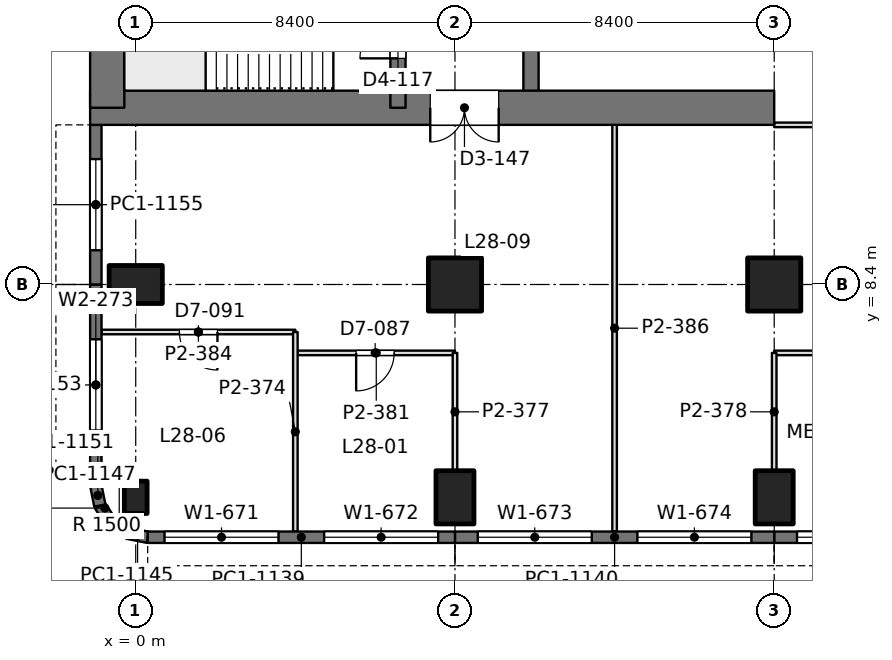
"""IFC4 building model, lengths in metres.
Left out: names, types, materials, properties, quantities, classifications, styles, units other than length and angle.
Written with IfcOpenShell. Run it as: python <this file> out.ifc"""

import sys

from ifc_helpers import new_model, si_unit, direction, frame, frame_2d, origin, origin_2d, place, context, subcontext, project, spatial, rectangle, extrude, element, fill, save


model = new_model("IFC4")
c1 = context("Model", 3, precision=1e-05, world=origin(), true_north=direction((0.0, 1.0)))
c2 = subcontext(c1, "Body", "Model", "MODEL_VIEW")
j1 = project(units=[si_unit("LENGTHUNIT", "METRE"), si_unit("PLANEANGLEUNIT", "RADIAN")], contexts=[c1])
p1 = place(None, origin())
s1 = spatial("IfcSite", under=j1, at=p1, CompositionType="ELEMENT")
p2 = place(p1, origin())
s2 = spatial("IfcBuilding", under=s1, at=p2, CompositionType="ELEMENT")
p3 = place(p2, frame((0.0, 0.0, 126.0)))
s3 = spatial("IfcBuildingStorey", under=s2, at=p3, CompositionType="ELEMENT", Elevation=126.0)
p4 = place(p3, frame((0.0, 2.8, 0.0), z_axis=(0.0, 0.0, 1.0), x_axis=(1.0, 0.0, 0.0)))
e1 = element("IfcColumn", 1, at=p4, inside=s3, PredefinedType="COLUMN", context=c2, shape_type="SweptSolid", body=[
    extrude(rectangle(XDim=0.6, YDim=0.85, at=origin_2d()), origin(), (0.0, 0.0, 1.0), 4.2),
])
for number, where, z_axis, x_axis in (
    (2, (0.0, 8.4, 0.0), (0.0, 0.0, 1.0), (0.0, 1.0, 0.0)),
    (3, (8.4, 2.8, 0.0), (0.0, 0.0, 1.0), (1.0, 0.0, 0.0)),
):
    element("IfcColumn", number, at=place(p3, frame(where, z_axis=z_axis, x_axis=x_axis)), inside=s3, PredefinedType="COLUMN", context=c2, shape_type="SweptSolid", body=[
        extrude(rectangle(XDim=1.0, YDim=1.4, at=origin_2d()), origin(), (0.0, 0.0, 1.0), 4.2),
    ])
p5 = place(p3, frame((8.4, 8.4, 0.0), z_axis=(0.0, 0.0, 1.0), x_axis=(1.0, 0.0, 0.0)))
e4 = element("IfcColumn", 4, at=p5, inside=s3, PredefinedType="COLUMN", context=c2, shape_type="SweptSolid", body=[
    extrude(rectangle(XDim=1.4, YDim=1.4, at=origin_2d()), origin(), (0.0, 0.0, 1.0), 4.2),
])
p6 = place(p3, frame((16.8, 2.8, 0.0), z_axis=(0.0, 0.0, 1.0), x_axis=(1.0, 0.0, 0.0)))
e5 = element("IfcColumn", 5, at=p6, inside=s3, PredefinedType="COLUMN", context=c2, shape_type="SweptSolid", body=[
    extrude(rectangle(XDim=1.0, YDim=1.4, at=origin_2d()), origin(), (0.0, 0.0, 1.0), 4.2),
])
p7 = place(p3, frame((16.8, 8.4, 0.0), z_axis=(0.0, 0.0, 1.0), x_axis=(1.0, 0.0, 0.0)))
e6 = element("IfcColumn", 6, at=p7, inside=s3, PredefinedType="COLUMN", context=c2, shape_type="SweptSolid", body=[
    extrude(rectangle(XDim=1.4, YDim=1.4, at=origin_2d()), origin(), (0.0, 0.0, 1.0), 4.2),
])
p8 = place(p3, frame((-1.2, 13.05, 0.0), z_axis=(0.0, 0.0, 1.0), x_axis=(1.0, 0.0, 0.0)))
e7 = element("IfcWall", 7, at=p8, inside=s3, PredefinedType="SHEAR", context=c2, shape_type="SweptSolid", body=[
    extrude(rectangle(XDim=18.0, YDim=0.9, at=frame_2d((9.0, 0.0))), origin(), (0.0, 0.0, 1.0), 4.2),
])
p9 = place(p8, frame((8.95, 0.0, 0.0)))
e8 = element("IfcOpeningElement", 8, at=p9, cuts=e7, PredefinedType="OPENING", context=c2, shape_type="SweptSolid", body=[
    extrude(rectangle(XDim=1.8, YDim=2.4, at=frame_2d((0.9, 1.2))), frame((0.0, 0.46, 0.0), z_axis=(0.0, -1.0, 0.0), x_axis=(1.0, 0.0, 0.0)), (0.0, 0.0, 1.0), 0.92),
])
p10 = place(p3, frame((-0.75, 13.05, 0.0), z_axis=(0.0, 0.0, 1.0), x_axis=(0.0, 1.0, 0.0)))
e9 = element("IfcWall", 9, at=p10, inside=s3, PredefinedType="SHEAR", context=c2, shape_type="SweptSolid", body=[
    extrude(rectangle(XDim=24.3, YDim=0.9, at=frame_2d((12.15, 0.0))), origin(), (0.0, 0.0, 1.0), 4.2),
])
p11 = place(p3, frame((6.9, 13.05, 0.0), z_axis=(0.0, 0.0, 1.0), x_axis=(0.0, 1.0, 0.0)))
e10 = element("IfcWall", 10, at=p11, inside=s3, PredefinedType="SHEAR", context=c2, shape_type="SweptSolid", body=[
    extrude(rectangle(XDim=24.3, YDim=0.4, at=frame_2d((12.15, 0.0))), origin(), (0.0, 0.0, 1.0), 4.2),
])
p12 = place(p11, frame((1.3, 0.0, 0.0)))
e11 = element("IfcOpeningElement", 11, at=p12, cuts=e10, PredefinedType="OPENING", context=c2, shape_type="SweptSolid", body=[
    extrude(rectangle(XDim=1.0, YDim=2.2, at=frame_2d((0.5, 1.1))), frame((0.0, 0.21, 0.0), z_axis=(0.0, -1.0, 0.0), x_axis=(1.0, 0.0, 0.0)), (0.0, 0.0, 1.0), 0.42),
])
p13 = place(p11, frame((22.0, 0.0, 0.0)))
e12 = element("IfcOpeningElement", 12, at=p13, cuts=e10, PredefinedType="OPENING", context=c2, shape_type="SweptSolid", body=[
    extrude(rectangle(XDim=1.0, YDim=2.2, at=frame_2d((0.5, 1.1))), frame((0.0, 0.21, 0.0), z_axis=(0.0, -1.0, 0.0), x_axis=(1.0, 0.0, 0.0)), (0.0, 0.0, 1.0), 0.42),
])
p14 = place(p11, frame((5.55, 0.0, 0.0)))
e13 = element("IfcOpeningElement", 13, at=p14, cuts=e10, PredefinedType="OPENING", context=c2, shape_type="SweptSolid", body=[
    extrude(rectangle(XDim=1.0, YDim=2.2, at=frame_2d((0.5, 1.1))), frame((0.0, 0.21, 0.0), z_axis=(0.0, -1.0, 0.0), x_axis=(1.0, 0.0, 0.0)), (0.0, 0.0, 1.0), 0.42),
])
p15 = place(p11, frame((9.55, 0.0, 0.0)))
e14 = element("IfcOpeningElement", 14, at=p15, cuts=e10, PredefinedType="OPENING", context=c2, shape_type="SweptSolid", body=[
    extrude(rectangle(XDim=1.0, YDim=2.2, at=frame_2d((0.5, 1.1))), frame((0.0, 0.21, 0.0), z_axis=(0.0, -1.0, 0.0), x_axis=(1.0, 0.0, 0.0)), (0.0, 0.0, 1.0), 0.42),
])
p16 = place(p11, frame((12.8, 0.0, 0.0)))
e15 = element("IfcOpeningElement", 15, at=p16, cuts=e10, PredefinedType="OPENING", context=c2, shape_type="SweptSolid", body=[
    extrude(rectangle(XDim=1.1, YDim=2.2, at=frame_2d((0.55, 1.1))), frame((0.0, 0.21, 0.0), z_axis=(0.0, -1.0, 0.0), x_axis=(1.0, 0.0, 0.0)), (0.0, 0.0, 1.0), 0.42),
])
p17 = place(p11, frame((15.538, 0.0, 0.0)))
e16 = element("IfcOpeningElement", 16, at=p17, cuts=e10, PredefinedType="OPENING", context=c2, shape_type="SweptSolid", body=[
    extrude(rectangle(XDim=1.1, YDim=2.2, at=frame_2d((0.55, 1.1))), frame((0.0, 0.21, 0.0), z_axis=(0.0, -1.0, 0.0), x_axis=(1.0, 0.0, 0.0)), (0.0, 0.0, 1.0), 0.42),
])
p18 = place(p11, frame((18.262, 0.0, 0.0)))
e17 = element("IfcOpeningElement", 17, at=p18, cuts=e10, PredefinedType="OPENING", context=c2, shape_type="SweptSolid", body=[
    extrude(rectangle(XDim=1.1, YDim=2.2, at=frame_2d((0.55, 1.1))), frame((0.0, 0.21, 0.0), z_axis=(0.0, -1.0, 0.0), x_axis=(1.0, 0.0, 0.0)), (0.0, 0.0, 1.0), 0.42),
])
p19 = place(p3, frame((10.4, 13.05, 0.0), z_axis=(0.0, 0.0, 1.0), x_axis=(0.0, 1.0, 0.0)))
e18 = element("IfcWall", 18, at=p19, inside=s3, PredefinedType="SHEAR", context=c2, shape_type="SweptSolid", body=[
    extrude(rectangle(XDim=24.3, YDim=0.4, at=frame_2d((12.15, 0.0))), origin(), (0.0, 0.0, 1.0), 4.2),
])
p20 = place(p19, frame((10.05, 0.0, 0.0)))
e19 = element("IfcOpeningElement", 19, at=p20, cuts=e18, PredefinedType="OPENING", context=c2, shape_type="SweptSolid", body=[
    extrude(rectangle(XDim=1.1, YDim=2.2, at=frame_2d((0.55, 1.1))), frame((0.0, 0.21, 0.0), z_axis=(0.0, -1.0, 0.0), x_axis=(1.0, 0.0, 0.0)), (0.0, 0.0, 1.0), 0.42),
])
p21 = place(p19, frame((12.9, 0.0, 0.0)))
e20 = element("IfcOpeningElement", 20, at=p21, cuts=e18, PredefinedType="OPENING", context=c2, shape_type="SweptSolid", body=[
    extrude(rectangle(XDim=1.1, YDim=2.2, at=frame_2d((0.55, 1.1))), frame((0.0, 0.21, 0.0), z_axis=(0.0, -1.0, 0.0), x_axis=(1.0, 0.0, 0.0)), (0.0, 0.0, 1.0), 0.42),
])
p22 = place(p19, frame((21.45, 0.0, 0.0)))
e21 = element("IfcOpeningElement", 21, at=p22, cuts=e18, PredefinedType="OPENING", context=c2, shape_type="SweptSolid", body=[
    extrude(rectangle(XDim=1.1, YDim=2.2, at=frame_2d((0.55, 1.1))), frame((0.0, 0.21, 0.0), z_axis=(0.0, -1.0, 0.0), x_axis=(1.0, 0.0, 0.0)), (0.0, 0.0, 1.0), 0.42),
])
p23 = place(p19, frame((2.35, 0.0, 0.0)))
e22 = element("IfcOpeningElement", 22, at=p23, cuts=e18, PredefinedType="OPENING", context=c2, shape_type="SweptSolid", body=[
    extrude(rectangle(XDim=1.8, YDim=2.4, at=frame_2d((0.9, 1.2))), frame((0.0, 0.21, 0.0), z_axis=(0.0, -1.0, 0.0), x_axis=(1.0, 0.0, 0.0)), (0.0, 0.0, 1.0), 0.42),
])
p24 = place(p19, frame((5.8, 0.0, 0.0)))
e23 = element("IfcOpeningElement", 23, at=p24, cuts=e18, PredefinedType="OPENING", context=c2, shape_type="SweptSolid", body=[
    extrude(rectangle(XDim=1.8, YDim=2.4, at=frame_2d((0.9, 1.2))), frame((0.0, 0.21, 0.0), z_axis=(0.0, -1.0, 0.0), x_axis=(1.0, 0.0, 0.0)), (0.0, 0.0, 1.0), 0.42),
])
p25 = place(p3, frame((25.2, 1.75, 0.0), z_axis=(0.0, 0.0, 1.0), x_axis=(-1.0, 0.0, 0.0)))
e24 = element("IfcWall", 24, at=p25, inside=s3, PredefinedType="SOLIDWALL", context=c2, shape_type="SweptSolid", body=[
    extrude(rectangle(XDim=8.4, YDim=0.3, at=frame_2d((4.2, 0.0))), origin(), (0.0, 0.0, 1.0), 4.05),
])
p26 = place(p25, frame((0.6, 0.0, 0.9)))
e25 = element("IfcOpeningElement", 25, at=p26, cuts=e24, PredefinedType="OPENING", context=c2, shape_type="SweptSolid", body=[
    extrude(rectangle(XDim=3.0, YDim=1.9, at=frame_2d((1.5, 0.95))), frame((0.0, 0.16, 0.0), z_axis=(0.0, -1.0, 0.0), x_axis=(1.0, 0.0, 0.0)), (0.0, 0.0, 1.0), 0.32),
])
p27 = place(p25, frame((4.8, 0.0, 0.9)))
e26 = element("IfcOpeningElement", 26, at=p27, cuts=e24, PredefinedType="OPENING", context=c2, shape_type="SweptSolid", body=[
    extrude(rectangle(XDim=3.0, YDim=1.9, at=frame_2d((1.5, 0.95))), frame((0.0, 0.16, 0.0), z_axis=(0.0, -1.0, 0.0), x_axis=(1.0, 0.0, 0.0)), (0.0, 0.0, 1.0), 0.32),
])
p28 = place(p3, frame((16.8, 1.75, 0.0), z_axis=(0.0, 0.0, 1.0), x_axis=(-1.0, 0.0, 0.0)))
e27 = element("IfcWall", 27, at=p28, inside=s3, PredefinedType="SOLIDWALL", context=c2, shape_type="SweptSolid", body=[
    extrude(rectangle(XDim=8.4, YDim=0.3, at=frame_2d((4.2, 0.0))), origin(), (0.0, 0.0, 1.0), 4.05),
])
p29 = place(p28, frame((0.6, 0.0, 0.9)))
e28 = element("IfcOpeningElement", 28, at=p29, cuts=e27, PredefinedType="OPENING", context=c2, shape_type="SweptSolid", body=[
    extrude(rectangle(XDim=3.0, YDim=1.9, at=frame_2d((1.5, 0.95))), frame((0.0, 0.16, 0.0), z_axis=(0.0, -1.0, 0.0), x_axis=(1.0, 0.0, 0.0)), (0.0, 0.0, 1.0), 0.32),
])
p30 = place(p28, frame((4.8, 0.0, 0.9)))
e29 = element("IfcOpeningElement", 29, at=p30, cuts=e27, PredefinedType="OPENING", context=c2, shape_type="SweptSolid", body=[
    extrude(rectangle(XDim=3.0, YDim=1.9, at=frame_2d((1.5, 0.95))), frame((0.0, 0.16, 0.0), z_axis=(0.0, -1.0, 0.0), x_axis=(1.0, 0.0, 0.0)), (0.0, 0.0, 1.0), 0.32),
])
p31 = place(p3, frame((8.4, 1.75, 0.0), z_axis=(0.0, 0.0, 1.0), x_axis=(-1.0, 0.0, 0.0)))
e30 = element("IfcWall", 30, at=p31, inside=s3, PredefinedType="SOLIDWALL", context=c2, shape_type="SweptSolid", body=[
    extrude(rectangle(XDim=8.085, YDim=0.3, at=frame_2d((4.042, 0.0))), origin(), (0.0, 0.0, 1.0), 4.05),
])
p32 = place(p31, frame((0.443, 0.0, 0.9)))
e31 = element("IfcOpeningElement", 31, at=p32, cuts=e30, PredefinedType="OPENING", context=c2, shape_type="SweptSolid", body=[
    extrude(rectangle(XDim=3.0, YDim=1.9, at=frame_2d((1.5, 0.95))), frame((0.0, 0.16, 0.0), z_axis=(0.0, -1.0, 0.0), x_axis=(1.0, 0.0, 0.0)), (0.0, 0.0, 1.0), 0.32),
])
p33 = place(p31, frame((4.643, 0.0, 0.9)))
e32 = element("IfcOpeningElement", 32, at=p33, cuts=e30, PredefinedType="OPENING", context=c2, shape_type="SweptSolid", body=[
    extrude(rectangle(XDim=3.0, YDim=1.9, at=frame_2d((1.5, 0.95))), frame((0.0, 0.16, 0.0), z_axis=(0.0, -1.0, 0.0), x_axis=(1.0, 0.0, 0.0)), (0.0, 0.0, 1.0), 0.32),
])
p34 = place(p3, frame((0.315, 1.75, 0.0), z_axis=(0.0, 0.0, 1.0), x_axis=(-0.980788534345, 0.195073962632, 0.0)))
e33 = element("IfcWall", 33, at=p34, inside=s3, PredefinedType="SOLIDWALL", context=c2, shape_type="SweptSolid", body=[
    extrude(rectangle(XDim=0.541, YDim=0.3, at=frame_2d((0.271, 0.0))), origin(), (0.0, 0.0, 1.0), 4.05),
])
for number, where, z_axis, x_axis in (
    (34, (-0.216, 1.855, 0.0), (0.0, 0.0, 1.0), (-0.831, 0.556, 0.0)),
    (35, (-0.653, 2.147, 0.0), (0.0, 0.0, 1.0), (-0.556, 0.831, 0.0)),
):
    element("IfcWall", number, at=place(p3, frame(where, z_axis=z_axis, x_axis=x_axis)), inside=s3, PredefinedType="SOLIDWALL", context=c2, shape_type="SweptSolid", body=[
        extrude(rectangle(XDim=0.526, YDim=0.3, at=frame_2d((0.263, 0.0))), origin(), (0.0, 0.0, 1.0), 4.05),
    ])
p35 = place(p3, frame((-0.945, 2.584, 0.0), z_axis=(0.0, 0.0, 1.0), x_axis=(-0.195073962632, 0.980788534345, 0.0)))
e36 = element("IfcWall", 36, at=p35, inside=s3, PredefinedType="SOLIDWALL", context=c2, shape_type="SweptSolid", body=[
    extrude(rectangle(XDim=0.541, YDim=0.3, at=frame_2d((0.271, 0.0))), origin(), (0.0, 0.0, 1.0), 4.05),
])
p36 = place(p3, frame((-1.05, 3.115, 0.0), z_axis=(0.0, 0.0, 1.0), x_axis=(0.0, 1.0, 0.0)))
e37 = element("IfcWall", 37, at=p36, inside=s3, PredefinedType="SOLIDWALL", context=c2, shape_type="SweptSolid", body=[
    extrude(rectangle(XDim=5.285, YDim=0.3, at=frame_2d((2.643, 0.0))), origin(), (0.0, 0.0, 1.0), 4.05),
])
p37 = place(p36, frame((1.443, 0.0, 0.9)))
e38 = element("IfcOpeningElement", 38, at=p37, cuts=e37, PredefinedType="OPENING", context=c2, shape_type="SweptSolid", body=[
    extrude(rectangle(XDim=2.4, YDim=1.9, at=frame_2d((1.2, 0.95))), frame((0.0, 0.16, 0.0), z_axis=(0.0, -1.0, 0.0), x_axis=(1.0, 0.0, 0.0)), (0.0, 0.0, 1.0), 0.32),
])
p38 = place(p3, frame((-1.05, 8.4, 0.0), z_axis=(0.0, 0.0, 1.0), x_axis=(0.0, 1.0, 0.0)))
e39 = element("IfcWall", 39, at=p38, inside=s3, PredefinedType="SOLIDWALL", context=c2, shape_type="SweptSolid", body=[
    extrude(rectangle(XDim=4.2, YDim=0.3, at=frame_2d((2.1, 0.0))), origin(), (0.0, 0.0, 1.0), 4.05),
])
p39 = place(p38, frame((0.9, 0.0, 0.9)))
e40 = element("IfcOpeningElement", 40, at=p39, cuts=e39, PredefinedType="OPENING", context=c2, shape_type="SweptSolid", body=[
    extrude(rectangle(XDim=2.4, YDim=1.9, at=frame_2d((1.2, 0.95))), frame((0.0, 0.16, 0.0), z_axis=(0.0, -1.0, 0.0), x_axis=(1.0, 0.0, 0.0)), (0.0, 0.0, 1.0), 0.32),
])
p40 = place(p3, frame((-0.902, 7.15, 0.0), z_axis=(0.0, 0.0, 1.0), x_axis=(1.0, 0.0, 0.0)))
e41 = element("IfcWall", 41, at=p40, inside=s3, PredefinedType="PARTITIONING", context=c2, shape_type="SweptSolid", body=[
    extrude(rectangle(XDim=5.102, YDim=0.12, at=frame_2d((2.551, 0.0))), origin(), (0.0, 0.0, 1.0), 3.56),
])
p41 = place(p40, frame((2.052, 0.0, 0.0)))
e42 = element("IfcOpeningElement", 42, at=p41, cuts=e41, PredefinedType="OPENING", context=c2, shape_type="SweptSolid", body=[
    extrude(rectangle(XDim=1.0, YDim=2.4, at=frame_2d((0.5, 1.2))), frame((0.0, 0.07, 0.0), z_axis=(0.0, -1.0, 0.0), x_axis=(1.0, 0.0, 0.0)), (0.0, 0.0, 1.0), 0.14),
])
p42 = place(p3, frame((4.258, 6.6, 0.0), z_axis=(0.0, 0.0, 1.0), x_axis=(1.0, 0.0, 0.0)))
e43 = element("IfcWall", 43, at=p42, inside=s3, PredefinedType="PARTITIONING", context=c2, shape_type="SweptSolid", body=[
    extrude(rectangle(XDim=4.142, YDim=0.12, at=frame_2d((2.071, 0.0))), origin(), (0.0, 0.0, 1.0), 3.55),
])
p43 = place(p42, frame((1.542, 0.0, 0.0)))
e44 = element("IfcOpeningElement", 44, at=p43, cuts=e43, PredefinedType="OPENING", context=c2, shape_type="SweptSolid", body=[
    extrude(rectangle(XDim=1.0, YDim=2.4, at=frame_2d((0.5, 1.2))), frame((0.0, 0.07, 0.0), z_axis=(0.0, -1.0, 0.0), x_axis=(1.0, 0.0, 0.0)), (0.0, 0.0, 1.0), 0.14),
])
p44 = place(p3, frame((4.2, 1.898, 0.0), z_axis=(0.0, 0.0, 1.0), x_axis=(0.0, 1.0, 0.0)))
e45 = element("IfcWall", 45, at=p44, inside=s3, PredefinedType="PARTITIONING", context=c2, shape_type="SweptSolid", body=[
    extrude(rectangle(XDim=5.252, YDim=0.12, at=frame_2d((2.626, 0.0))), origin(), (0.0, 0.0, 1.0), 3.56),
])
p45 = place(p3, frame((8.4, 3.499, 0.0), z_axis=(0.0, 0.0, 1.0), x_axis=(0.0, 1.0, 0.0)))
e46 = element("IfcWall", 46, at=p45, inside=s3, PredefinedType="PARTITIONING", context=c2, shape_type="SweptSolid", body=[
    extrude(rectangle(XDim=3.101, YDim=0.12, at=frame_2d((1.551, 0.0))), origin(), (0.0, 0.0, 1.0), 3.55),
])
p46 = place(p3, frame((16.8, 6.6, 0.0), z_axis=(0.0, 0.0, 1.0), x_axis=(1.0, 0.0, 0.0)))
e47 = element("IfcWall", 47, at=p46, inside=s3, PredefinedType="PARTITIONING", context=c2, shape_type="SweptSolid", body=[
    extrude(rectangle(XDim=8.4, YDim=0.12, at=frame_2d((4.2, 0.0))), origin(), (0.0, 0.0, 1.0), 3.55),
])
p47 = place(p46, frame((3.3, 0.0, 0.0)))
e48 = element("IfcOpeningElement", 48, at=p47, cuts=e47, PredefinedType="OPENING", context=c2, shape_type="SweptSolid", body=[
    extrude(rectangle(XDim=1.8, YDim=2.2, at=frame_2d((0.9, 1.1))), frame((0.0, 0.07, 0.0), z_axis=(0.0, -1.0, 0.0), x_axis=(1.0, 0.0, 0.0)), (0.0, 0.0, 1.0), 0.14),
])
p48 = place(p3, frame((16.8, 3.499, 0.0), z_axis=(0.0, 0.0, 1.0), x_axis=(0.0, 1.0, 0.0)))
e49 = element("IfcWall", 49, at=p48, inside=s3, PredefinedType="PARTITIONING", context=c2, shape_type="SweptSolid", body=[
    extrude(rectangle(XDim=3.101, YDim=0.12, at=frame_2d((1.551, 0.0))), origin(), (0.0, 0.0, 1.0), 3.55),
])
p49 = place(p3, frame((12.6, 1.898, 0.0), z_axis=(0.0, 0.0, 1.0), x_axis=(0.0, 1.0, 0.0)))
e50 = element("IfcWall", 50, at=p49, inside=s3, PredefinedType="PARTITIONING", context=c2, shape_type="SweptSolid", body=[
    extrude(rectangle(XDim=10.704, YDim=0.12, at=frame_2d((5.352, 0.0))), origin(), (0.0, 0.0, 1.0), 3.55),
])
p50 = place(p3, frame((16.8, 12.6, 0.0), z_axis=(0.0, 0.0, 1.0), x_axis=(1.0, 0.0, 0.0)))
e51 = element("IfcWall", 51, at=p50, inside=s3, PredefinedType="PARTITIONING", context=c2, shape_type="SweptSolid", body=[
    extrude(rectangle(XDim=16.8, YDim=0.12, at=frame_2d((8.4, 0.0))), origin(), (0.0, 0.0, 1.0), 3.55),
])
p51 = place(p27, origin())
e52 = element("IfcWindow", 52, at=p51, inside=s3, PartitioningType="SINGLE_PANEL", PredefinedType="WINDOW", context=c2, shape_type="SweptSolid", body=[
    extrude(rectangle(XDim=3.0, YDim=1.9, at=frame_2d((1.5, 0.95))), frame((0.0, 0.03, 0.0), z_axis=(0.0, -1.0, 0.0), x_axis=(1.0, 0.0, 0.0)), (0.0, 0.0, 1.0), 0.06),
])
fill(e26, e52)
p52 = place(p29, origin())
e53 = element("IfcWindow", 53, at=p52, inside=s3, PartitioningType="SINGLE_PANEL", PredefinedType="WINDOW", context=c2, shape_type="SweptSolid", body=[
    extrude(rectangle(XDim=3.0, YDim=1.9, at=frame_2d((1.5, 0.95))), frame((0.0, 0.03, 0.0), z_axis=(0.0, -1.0, 0.0), x_axis=(1.0, 0.0, 0.0)), (0.0, 0.0, 1.0), 0.06),
])
fill(e28, e53)
p53 = place(p30, origin())
e54 = element("IfcWindow", 54, at=p53, inside=s3, PartitioningType="SINGLE_PANEL", PredefinedType="WINDOW", context=c2, shape_type="SweptSolid", body=[
    extrude(rectangle(XDim=3.0, YDim=1.9, at=frame_2d((1.5, 0.95))), frame((0.0, 0.03, 0.0), z_axis=(0.0, -1.0, 0.0), x_axis=(1.0, 0.0, 0.0)), (0.0, 0.0, 1.0), 0.06),
])
fill(e29, e54)
p54 = place(p32, origin())
e55 = element("IfcWindow", 55, at=p54, inside=s3, PartitioningType="SINGLE_PANEL", PredefinedType="WINDOW", context=c2, shape_type="SweptSolid", body=[
    extrude(rectangle(XDim=3.0, YDim=1.9, at=frame_2d((1.5, 0.95))), frame((0.0, 0.03, 0.0), z_axis=(0.0, -1.0, 0.0), x_axis=(1.0, 0.0, 0.0)), (0.0, 0.0, 1.0), 0.06),
])
fill(e31, e55)
p55 = place(p33, origin())
e56 = element("IfcWindow", 56, at=p55, inside=s3, PartitioningType="SINGLE_PANEL", PredefinedType="WINDOW", context=c2, shape_type="SweptSolid", body=[
    extrude(rectangle(XDim=3.0, YDim=1.9, at=frame_2d((1.5, 0.95))), frame((0.0, 0.03, 0.0), z_axis=(0.0, -1.0, 0.0), x_axis=(1.0, 0.0, 0.0)), (0.0, 0.0, 1.0), 0.06),
])
fill(e32, e56)
p56 = place(p37, origin())
e57 = element("IfcWindow", 57, at=p56, inside=s3, PartitioningType="SINGLE_PANEL", PredefinedType="WINDOW", context=c2, shape_type="SweptSolid", body=[
    extrude(rectangle(XDim=2.4, YDim=1.9, at=frame_2d((1.2, 0.95))), frame((0.0, 0.03, 0.0), z_axis=(0.0, -1.0, 0.0), x_axis=(1.0, 0.0, 0.0)), (0.0, 0.0, 1.0), 0.06),
])
fill(e38, e57)
p57 = place(p39, origin())
e58 = element("IfcWindow", 58, at=p57, inside=s3, PartitioningType="SINGLE_PANEL", PredefinedType="WINDOW", context=c2, shape_type="SweptSolid", body=[
    extrude(rectangle(XDim=2.4, YDim=1.9, at=frame_2d((1.2, 0.95))), frame((0.0, 0.03, 0.0), z_axis=(0.0, -1.0, 0.0), x_axis=(1.0, 0.0, 0.0)), (0.0, 0.0, 1.0), 0.06),
])
fill(e40, e58)
p58 = place(p9, frame((1.8, 0.0, 0.0), z_axis=(0.0, 0.0, 1.0), x_axis=(-1.0, 0.0, 0.0)))
e59 = element("IfcDoor", 59, at=p58, inside=s3, OperationType="DOUBLE_DOOR_SINGLE_SWING", PredefinedType="DOOR", context=c2, shape_type="SweptSolid", body=[
    extrude(rectangle(XDim=1.8, YDim=2.4, at=frame_2d((0.9, 1.2))), frame((0.0, 0.025, 0.0), z_axis=(0.0, -1.0, 0.0), x_axis=(1.0, 0.0, 0.0)), (0.0, 0.0, 1.0), 0.05),
])
fill(e8, e59)
p59 = place(p12, origin())
e60 = element("IfcDoor", 60, at=p59, inside=s3, OperationType="SINGLE_SWING_LEFT", PredefinedType="DOOR", context=c2, shape_type="SweptSolid", body=[
    extrude(rectangle(XDim=1.0, YDim=2.2, at=frame_2d((0.5, 1.1))), frame((0.0, 0.025, 0.0), z_axis=(0.0, -1.0, 0.0), x_axis=(1.0, 0.0, 0.0)), (0.0, 0.0, 1.0), 0.05),
])
fill(e11, e60)
p60 = place(p41, frame((1.0, 0.0, 0.0), z_axis=(0.0, 0.0, 1.0), x_axis=(-1.0, 0.0, 0.0)))
e61 = element("IfcDoor", 61, at=p60, inside=s3, OperationType="SINGLE_SWING_LEFT", PredefinedType="DOOR", context=c2, shape_type="SweptSolid", body=[
    extrude(rectangle(XDim=1.0, YDim=2.4, at=frame_2d((0.5, 1.2))), frame((0.0, 0.025, 0.0), z_axis=(0.0, -1.0, 0.0), x_axis=(1.0, 0.0, 0.0)), (0.0, 0.0, 1.0), 0.05),
])
fill(e42, e61)
p61 = place(p43, frame((1.0, 0.0, 0.0), z_axis=(0.0, 0.0, 1.0), x_axis=(-1.0, 0.0, 0.0)))
e62 = element("IfcDoor", 62, at=p61, inside=s3, OperationType="SINGLE_SWING_RIGHT", PredefinedType="DOOR", context=c2, shape_type="SweptSolid", body=[
    extrude(rectangle(XDim=1.0, YDim=2.4, at=frame_2d((0.5, 1.2))), frame((0.0, 0.025, 0.0), z_axis=(0.0, -1.0, 0.0), x_axis=(1.0, 0.0, 0.0)), (0.0, 0.0, 1.0), 0.05),
])
fill(e44, e62)
save(model, sys.argv[1])
